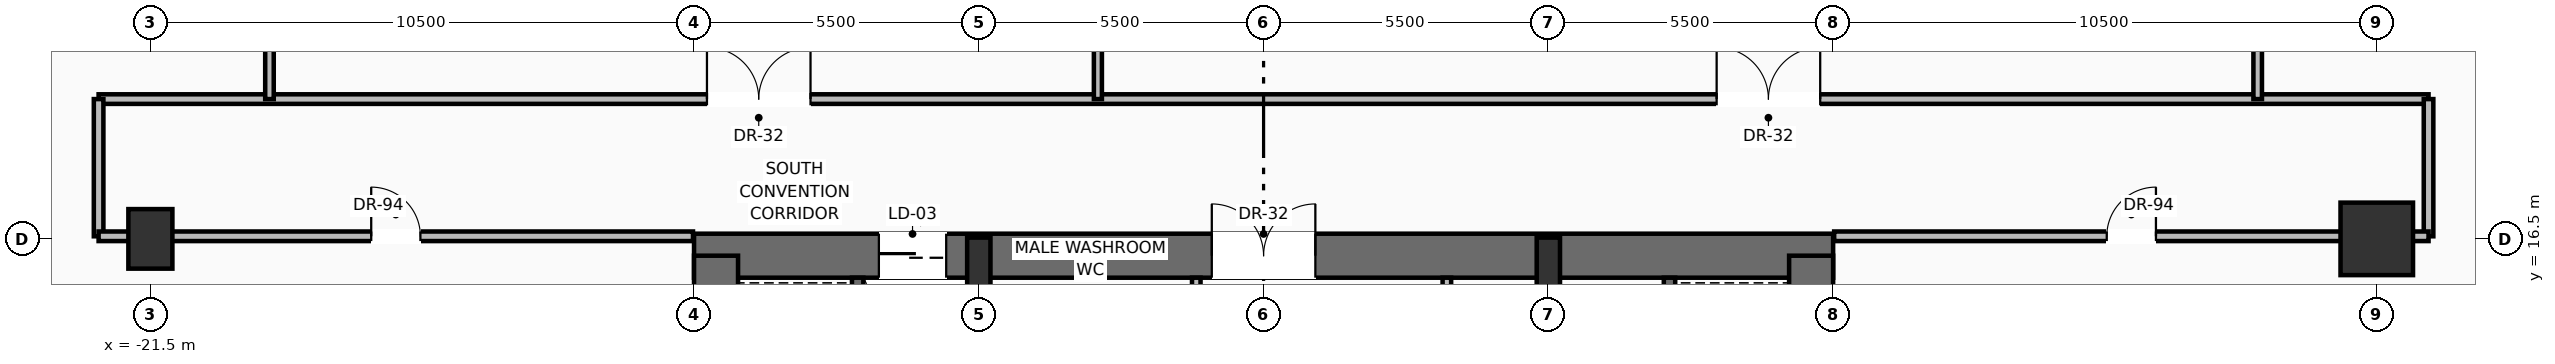
"""IFC4 building model, lengths in metres.
Left out: names, types, materials, properties, quantities, classifications, styles, units other than length and angle.
Written with IfcOpenShell. Run it as: python <this file> out.ifc"""

import sys

from ifc_helpers import new_model, si_unit, direction, frame, frame_2d, origin, origin_2d, place, context, subcontext, project, spatial, rectangle, hollow_rectangle, extrude, source, transform, mapped, element, fill, save


model = new_model("IFC4")
c1 = context("Model", 3, precision=1e-05, world=origin(), true_north=direction((0.0, 1.0)))
c2 = subcontext(c1, "Body", "Model", "MODEL_VIEW")
j1 = project(units=[si_unit("LENGTHUNIT", "METRE"), si_unit("PLANEANGLEUNIT", "RADIAN")], contexts=[c1])
p1 = place(None, origin())
s1 = spatial("IfcSite", under=j1, at=p1, CompositionType="ELEMENT")
p2 = place(p1, origin())
s2 = spatial("IfcBuilding", under=s1, at=p2, CompositionType="ELEMENT")
p3 = place(p2, frame((0.0, 0.0, 5.5)))
s3 = spatial("IfcBuildingStorey", under=s2, at=p3, CompositionType="ELEMENT", Elevation=5.5)
p4 = place(p3, frame((-11.0, 16.175, 0.0), z_axis=(0.0, 0.0, 1.0), x_axis=(1.0, 0.0, 0.0)))
e1 = element("IfcWall", 1, at=p4, inside=s3, PredefinedType="SHEAR", context=c2, shape_type="SweptSolid", body=[
    extrude(rectangle(XDim=22.0, YDim=0.85, at=frame_2d((11.0, 0.0))), origin(), (0.0, 0.0, 1.0), 5.17),
])
p5 = place(p4, frame((3.57, 0.0, 0.0)))
e2 = element("IfcOpeningElement", 2, at=p5, cuts=e1, PredefinedType="OPENING", context=c2, shape_type="SweptSolid", body=[
    extrude(rectangle(XDim=1.3, YDim=2.3, at=frame_2d((0.65, 1.15))), frame((0.0, 0.435, 0.0), z_axis=(0.0, -1.0, 0.0), x_axis=(1.0, 0.0, 0.0)), (0.0, 0.0, 1.0), 0.87),
])
p6 = place(p4, frame((10.0, 0.0, 0.0)))
e3 = element("IfcOpeningElement", 3, at=p6, cuts=e1, PredefinedType="OPENING", context=c2, shape_type="SweptSolid", body=[
    extrude(rectangle(XDim=2.0, YDim=2.4, at=frame_2d((1.0, 1.2))), frame((0.0, 0.435, 0.0), z_axis=(0.0, -1.0, 0.0), x_axis=(1.0, 0.0, 0.0)), (0.0, 0.0, 1.0), 0.87),
])
for number, where, z_axis, x_axis in (
    (4, (-10.575, 0.425, 0.0), (0.0, 0.0, 1.0), (0.0, 1.0, 0.0)),
    (5, (10.575, 0.425, 0.0), (0.0, 0.0, 1.0), (0.0, 1.0, 0.0)),
):
    element("IfcWall", number, at=place(p3, frame(where, z_axis=z_axis, x_axis=x_axis)), inside=s3, PredefinedType="SHEAR", context=c2, shape_type="SweptSolid", body=[
        extrude(rectangle(XDim=15.75, YDim=0.85, at=frame_2d((7.875, 0.0))), origin(), (0.0, 0.0, 1.0), 5.17),
    ])
p7 = place(p3, frame((-5.5, 0.425, 0.0), z_axis=(0.0, 0.0, 1.0), x_axis=(0.0, 1.0, 0.0)))
e6 = element("IfcWall", 6, at=p7, inside=s3, PredefinedType="SHEAR", context=c2, shape_type="SweptSolid", body=[
    extrude(rectangle(XDim=15.75, YDim=0.4, at=frame_2d((7.875, 0.0))), origin(), (0.0, 0.0, 1.0), 5.17),
])
p8 = place(p7, frame((9.075, 0.0, 0.0)))
e7 = element("IfcOpeningElement", 7, at=p8, cuts=e6, PredefinedType="OPENING", context=c2, shape_type="SweptSolid", body=[
    extrude(rectangle(XDim=1.1, YDim=2.2, at=frame_2d((0.55, 1.1))), frame((0.0, 0.21, 0.0), z_axis=(0.0, -1.0, 0.0), x_axis=(1.0, 0.0, 0.0)), (0.0, 0.0, 1.0), 0.42),
])
p9 = place(p3, frame((5.5, 0.425, 0.0), z_axis=(0.0, 0.0, 1.0), x_axis=(0.0, 1.0, 0.0)))
e8 = element("IfcWall", 8, at=p9, inside=s3, PredefinedType="SHEAR", context=c2, shape_type="SweptSolid", body=[
    extrude(rectangle(XDim=15.75, YDim=0.4, at=frame_2d((7.875, 0.0))), origin(), (0.0, 0.0, 1.0), 5.17),
])
p10 = place(p9, frame((9.075, 0.0, 0.0)))
e9 = element("IfcOpeningElement", 9, at=p10, cuts=e8, PredefinedType="OPENING", context=c2, shape_type="SweptSolid", body=[
    extrude(rectangle(XDim=1.1, YDim=2.2, at=frame_2d((0.55, 1.1))), frame((0.0, 0.21, 0.0), z_axis=(0.0, -1.0, 0.0), x_axis=(1.0, 0.0, 0.0)), (0.0, 0.0, 1.0), 0.42),
])
m1 = source(origin(), c2, "Body", "SweptSolid", [
    extrude(rectangle(XDim=0.45, YDim=0.95, at=origin_2d()), origin(), (0.0, 0.0, 1.0), 5.5),
])
for number, where, z_axis, x_axis in (
    (10, (-5.5, 16.05, 0.0), (0.0, 0.0, 1.0), (1.0, 0.0, 0.0)),
    (11, (5.5, 16.05, 0.0), (0.0, 0.0, 1.0), (1.0, 0.0, 0.0)),
):
    element("IfcColumn", number, at=place(p3, frame(where, z_axis=z_axis, x_axis=x_axis)), inside=s3, PredefinedType="PILASTER", context=c2, shape_type="MappedRepresentation", body=[
        mapped(m1, transform((0.0, 0.0, 0.0), scale=1.0)),
    ])
m2 = source(origin(), c2, "Body", "SweptSolid", [
    extrude(rectangle(XDim=0.85, YDim=1.15, at=origin_2d()), origin(), (0.0, 0.0, 1.0), 5.5),
])
p11 = place(p3, frame((-21.5, 16.5, 0.0), z_axis=(0.0, 0.0, 1.0), x_axis=(1.0, 0.0, 0.0)))
e12 = element("IfcColumn", 12, at=p11, inside=s3, PredefinedType="COLUMN", context=c2, shape_type="MappedRepresentation", body=[
    mapped(m2, transform((0.0, 0.0, 0.0), scale=1.0)),
])
m3 = source(origin(), c2, "Body", "SweptSolid", [
    extrude(hollow_rectangle(XDim=1.4, YDim=1.4, WallThickness=0.07, at=origin_2d()), origin(), (0.0, 0.0, 1.0), 5.5),
])
p12 = place(p3, frame((21.5, 16.5, 0.0), z_axis=(0.0, 0.0, 1.0), x_axis=(1.0, 0.0, 0.0)))
e13 = element("IfcColumn", 13, at=p12, inside=s3, PredefinedType="COLUMN", context=c2, shape_type="MappedRepresentation", body=[
    mapped(m3, transform((0.0, 0.0, 0.0), scale=1.0)),
])
for number, where, z_axis, x_axis in (
    (14, (-7.84, 11.87, 0.0), (0.0, 0.0, 1.0), (0.0, 1.0, 0.0)),
    (15, (7.84, 11.87, 0.0), (0.0, 0.0, 1.0), (0.0, 1.0, 0.0)),
):
    element("IfcWall", number, at=place(p3, frame(where, z_axis=z_axis, x_axis=x_axis)), inside=s3, PredefinedType="SOLIDWALL", context=c2, shape_type="SweptSolid", body=[
        extrude(rectangle(XDim=3.88, YDim=0.22, at=frame_2d((1.94, 0.0))), origin(), (0.0, 0.0, 1.0), 5.17),
    ])
p13 = place(p3, frame((-1.3, 13.6, 0.0), z_axis=(0.0, 0.0, 1.0), x_axis=(0.0, 1.0, 0.0)))
e16 = element("IfcWall", 16, at=p13, inside=s3, PredefinedType="PARTITIONING", context=c2, shape_type="SweptSolid", body=[
    extrude(rectangle(XDim=2.15, YDim=0.165, at=frame_2d((1.075, 0.0))), origin(), (0.0, 0.0, 1.0), 5.162),
])
p14 = place(p13, frame((0.55, 0.0, 0.0)))
e17 = element("IfcOpeningElement", 17, at=p14, cuts=e16, PredefinedType="OPENING", context=c2, shape_type="SweptSolid", body=[
    extrude(rectangle(XDim=0.9, YDim=2.1, at=frame_2d((0.45, 1.05))), frame((0.0, 0.093, 0.0), z_axis=(0.0, -1.0, 0.0), x_axis=(1.0, 0.0, 0.0)), (0.0, 0.0, 1.0), 0.185),
])
p15 = place(p3, frame((3.54, 11.22, 0.0), z_axis=(0.0, 0.0, 1.0), x_axis=(0.0, 1.0, 0.0)))
e18 = element("IfcWall", 18, at=p15, inside=s3, PredefinedType="PARTITIONING", context=c2, shape_type="SweptSolid", body=[
    extrude(rectangle(XDim=4.53, YDim=0.165, at=frame_2d((2.265, 0.0))), origin(), (0.0, 0.0, 1.0), 5.162),
])
p16 = place(p15, frame((1.25, 0.0, 0.0)))
e19 = element("IfcOpeningElement", 19, at=p16, cuts=e18, PredefinedType="OPENING", context=c2, shape_type="SweptSolid", body=[
    extrude(rectangle(XDim=0.9, YDim=2.1, at=frame_2d((0.45, 1.05))), frame((0.0, 0.093, 0.0), z_axis=(0.0, -1.0, 0.0), x_axis=(1.0, 0.0, 0.0)), (0.0, 0.0, 1.0), 0.185),
])
p17 = place(p3, frame((-22.5, 19.2, 0.0), z_axis=(0.0, 0.0, 1.0), x_axis=(1.0, 0.0, 0.0)))
e20 = element("IfcWall", 20, at=p17, inside=s3, PredefinedType="PARTITIONING", context=c2, shape_type="SweptSolid", body=[
    extrude(rectangle(XDim=45.0, YDim=0.185, at=frame_2d((22.5, 0.0))), origin(), (0.0, 0.0, 1.0), 4.122),
])
p18 = place(p17, frame((11.75, 0.0, 0.0)))
e21 = element("IfcOpeningElement", 21, at=p18, cuts=e20, PredefinedType="OPENING", context=c2, shape_type="SweptSolid", body=[
    extrude(rectangle(XDim=2.0, YDim=2.4, at=frame_2d((1.0, 1.2))), frame((0.0, 0.103, 0.0), z_axis=(0.0, -1.0, 0.0), x_axis=(1.0, 0.0, 0.0)), (0.0, 0.0, 1.0), 0.205),
])
p19 = place(p17, frame((31.25, 0.0, 0.0)))
e22 = element("IfcOpeningElement", 22, at=p19, cuts=e20, PredefinedType="OPENING", context=c2, shape_type="SweptSolid", body=[
    extrude(rectangle(XDim=2.0, YDim=2.4, at=frame_2d((1.0, 1.2))), frame((0.0, 0.103, 0.0), z_axis=(0.0, -1.0, 0.0), x_axis=(1.0, 0.0, 0.0)), (0.0, 0.0, 1.0), 0.205),
])
for number, where, z_axis, x_axis in (
    (23, (-22.5, 16.55, 0.0), (0.0, 0.0, 1.0), (0.0, 1.0, 0.0)),
    (24, (22.5, 16.55, 0.0), (0.0, 0.0, 1.0), (0.0, 1.0, 0.0)),
):
    element("IfcWall", number, at=place(p3, frame(where, z_axis=z_axis, x_axis=x_axis)), inside=s3, PredefinedType="PARTITIONING", context=c2, shape_type="SweptSolid", body=[
        extrude(rectangle(XDim=2.65, YDim=0.185, at=frame_2d((1.325, 0.0))), origin(), (0.0, 0.0, 1.0), 5.162),
    ])
p20 = place(p3, frame((-22.5, 16.55, 0.0), z_axis=(0.0, 0.0, 1.0), x_axis=(1.0, 0.0, 0.0)))
e25 = element("IfcWall", 25, at=p20, inside=s3, PredefinedType="PARTITIONING", context=c2, shape_type="SweptSolid", body=[
    extrude(rectangle(XDim=11.48, YDim=0.185, at=frame_2d((5.74, 0.0))), origin(), (0.0, 0.0, 1.0), 4.122),
])
p21 = place(p20, frame((5.265, 0.0, 0.0)))
e26 = element("IfcOpeningElement", 26, at=p21, cuts=e25, PredefinedType="OPENING", context=c2, shape_type="SweptSolid", body=[
    extrude(rectangle(XDim=0.95, YDim=2.2, at=frame_2d((0.475, 1.1))), frame((0.0, 0.103, 0.0), z_axis=(0.0, -1.0, 0.0), x_axis=(1.0, 0.0, 0.0)), (0.0, 0.0, 1.0), 0.205),
])
p22 = place(p3, frame((11.02, 16.55, 0.0), z_axis=(0.0, 0.0, 1.0), x_axis=(1.0, 0.0, 0.0)))
e27 = element("IfcWall", 27, at=p22, inside=s3, PredefinedType="PARTITIONING", context=c2, shape_type="SweptSolid", body=[
    extrude(rectangle(XDim=11.48, YDim=0.185, at=frame_2d((5.74, 0.0))), origin(), (0.0, 0.0, 1.0), 4.122),
])
p23 = place(p22, frame((5.265, 0.0, 0.0)))
e28 = element("IfcOpeningElement", 28, at=p23, cuts=e27, PredefinedType="OPENING", context=c2, shape_type="SweptSolid", body=[
    extrude(rectangle(XDim=0.95, YDim=2.2, at=frame_2d((0.475, 1.1))), frame((0.0, 0.103, 0.0), z_axis=(0.0, -1.0, 0.0), x_axis=(1.0, 0.0, 0.0)), (0.0, 0.0, 1.0), 0.205),
])
p24 = place(p3, frame((-19.2, 19.2, 0.0), z_axis=(0.0, 0.0, 1.0), x_axis=(0.0, 1.0, 0.0)))
e29 = element("IfcWall", 29, at=p24, inside=s3, PredefinedType="PARTITIONING", context=c2, shape_type="SweptSolid", body=[
    extrude(rectangle(XDim=21.2, YDim=0.165, at=frame_2d((10.6, 0.0))), origin(), (0.0, 0.0, 1.0), 4.122),
])
p25 = place(p24, frame((8.824, 0.0, 0.0)))
e30 = element("IfcOpeningElement", 30, at=p25, cuts=e29, PredefinedType="OPENING", context=c2, shape_type="SweptSolid", body=[
    extrude(rectangle(XDim=1.5, YDim=2.25, at=frame_2d((0.75, 1.125))), frame((0.0, 0.093, 0.0), z_axis=(0.0, -1.0, 0.0), x_axis=(1.0, 0.0, 0.0)), (0.0, 0.0, 1.0), 0.185),
])
p26 = place(p3, frame((19.2, 19.2, 0.0), z_axis=(0.0, 0.0, 1.0), x_axis=(0.0, 1.0, 0.0)))
e31 = element("IfcWall", 31, at=p26, inside=s3, PredefinedType="PARTITIONING", context=c2, shape_type="SweptSolid", body=[
    extrude(rectangle(XDim=21.2, YDim=0.165, at=frame_2d((10.6, 0.0))), origin(), (0.0, 0.0, 1.0), 4.122),
])
p27 = place(p26, frame((8.824, 0.0, 0.0)))
e32 = element("IfcOpeningElement", 32, at=p27, cuts=e31, PredefinedType="OPENING", context=c2, shape_type="SweptSolid", body=[
    extrude(rectangle(XDim=1.5, YDim=2.25, at=frame_2d((0.75, 1.125))), frame((0.0, 0.093, 0.0), z_axis=(0.0, -1.0, 0.0), x_axis=(1.0, 0.0, 0.0)), (0.0, 0.0, 1.0), 0.185),
])
p28 = place(p3, frame((-3.2, 19.2, 0.0), z_axis=(0.0, 0.0, 1.0), x_axis=(0.0, 1.0, 0.0)))
e33 = element("IfcWall", 33, at=p28, inside=s3, PredefinedType="MOVABLE", context=c2, shape_type="SweptSolid", body=[
    extrude(rectangle(XDim=21.2, YDim=0.155, at=frame_2d((10.6, 0.0))), origin(), (0.0, 0.0, 1.0), 4.122),
])
p29 = place(p28, frame((9.85, 0.0, 0.0)))
e34 = element("IfcOpeningElement", 34, at=p29, cuts=e33, PredefinedType="OPENING", context=c2, shape_type="SweptSolid", body=[
    extrude(rectangle(XDim=1.5, YDim=2.25, at=frame_2d((0.75, 1.125))), frame((0.0, 0.087, 0.0), z_axis=(0.0, -1.0, 0.0), x_axis=(1.0, 0.0, 0.0)), (0.0, 0.0, 1.0), 0.175),
])
m4 = source(origin(), c2, "Body", "SweptSolid", [
    extrude(rectangle(XDim=1.3, YDim=2.3, at=frame_2d((0.65, 1.15))), frame((0.0, 0.025, 0.0), z_axis=(0.0, -1.0, 0.0), x_axis=(1.0, 0.0, 0.0)), (0.0, 0.0, 1.0), 0.05),
])
p30 = place(p5, origin())
e35 = element("IfcDoor", 35, at=p30, inside=s3, OperationType="SLIDING_TO_RIGHT", PredefinedType="DOOR", context=c2, shape_type="MappedRepresentation", body=[
    mapped(m4, transform((0.0, 0.0, 0.0), scale=1.0)),
])
fill(e2, e35)
m5 = source(origin(), c2, "Body", "SweptSolid", [
    extrude(rectangle(XDim=2.0, YDim=2.4, at=frame_2d((1.0, 1.2))), frame((0.0, 0.025, 0.0), z_axis=(0.0, -1.0, 0.0), x_axis=(1.0, 0.0, 0.0)), (0.0, 0.0, 1.0), 0.05),
])
p31 = place(p6, origin())
e36 = element("IfcDoor", 36, at=p31, inside=s3, OperationType="DOUBLE_DOOR_SINGLE_SWING", PredefinedType="DOOR", context=c2, shape_type="MappedRepresentation", body=[
    mapped(m5, transform((0.0, 0.0, 0.0), scale=1.0)),
])
fill(e3, e36)
p32 = place(p18, origin())
e37 = element("IfcDoor", 37, at=p32, inside=s3, OperationType="DOUBLE_DOOR_SINGLE_SWING", PredefinedType="DOOR", context=c2, shape_type="MappedRepresentation", body=[
    mapped(m5, transform((0.0, 0.0, 0.0), scale=1.0)),
])
fill(e21, e37)
p33 = place(p19, origin())
e38 = element("IfcDoor", 38, at=p33, inside=s3, OperationType="DOUBLE_DOOR_SINGLE_SWING", PredefinedType="DOOR", context=c2, shape_type="MappedRepresentation", body=[
    mapped(m5, transform((0.0, 0.0, 0.0), scale=1.0)),
])
fill(e22, e38)
m6 = source(origin(), c2, "Body", "SweptSolid", [
    extrude(rectangle(XDim=0.95, YDim=2.2, at=frame_2d((0.475, 1.1))), frame((0.0, 0.025, 0.0), z_axis=(0.0, -1.0, 0.0), x_axis=(1.0, 0.0, 0.0)), (0.0, 0.0, 1.0), 0.05),
])
p34 = place(p21, origin())
e39 = element("IfcDoor", 39, at=p34, inside=s3, OperationType="SINGLE_SWING_LEFT", PredefinedType="DOOR", context=c2, shape_type="MappedRepresentation", body=[
    mapped(m6, transform((0.0, 0.0, 0.0), scale=1.0)),
])
fill(e26, e39)
p35 = place(p23, origin())
e40 = element("IfcDoor", 40, at=p35, inside=s3, OperationType="SINGLE_SWING_RIGHT", PredefinedType="DOOR", context=c2, shape_type="MappedRepresentation", body=[
    mapped(m6, transform((0.0, 0.0, 0.0), scale=1.0)),
])
fill(e28, e40)
save(model, sys.argv[1])
